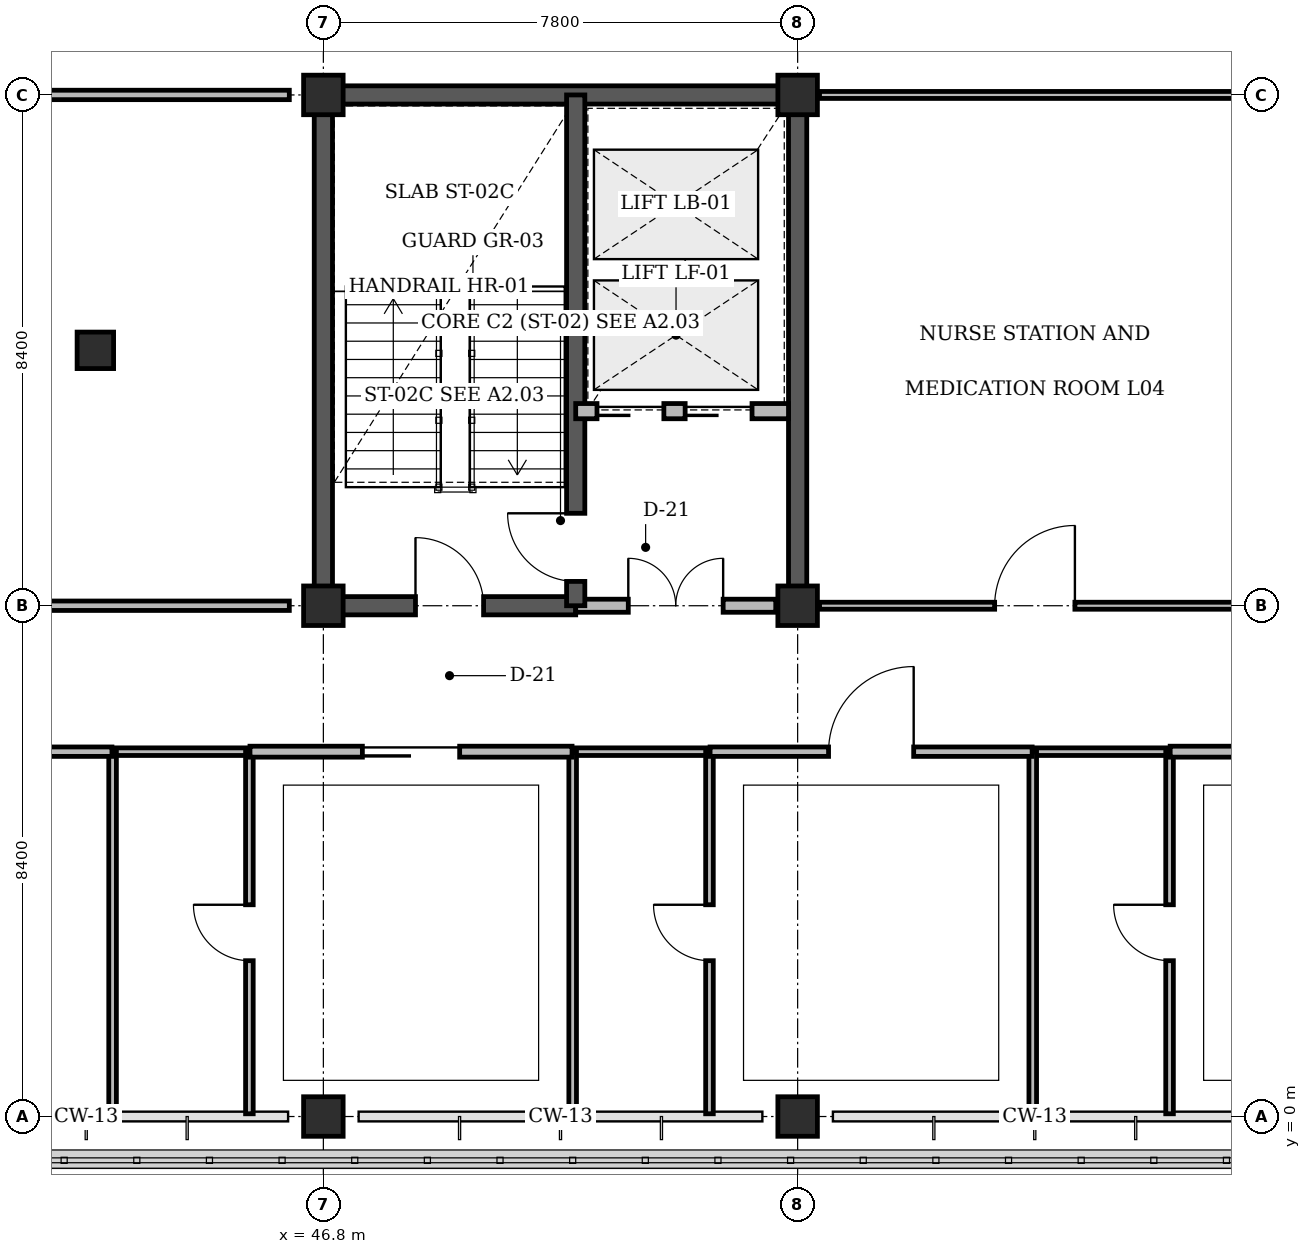
"""IFC4 building model, lengths in metres.
Left out: names, types, materials, properties, quantities, classifications, styles, units other than length and angle.
Written with IfcOpenShell. Run it as: python <this file> out.ifc"""

import sys

from ifc_helpers import new_model, si_unit, direction, frame, frame_2d, origin, origin_2d, place, context, subcontext, project, spatial, rectangle, circle, extrude, element, fill, save


model = new_model("IFC4")
c1 = context("Model", 3, precision=1e-05, world=origin(), true_north=direction((0.0, 1.0)))
c2 = subcontext(c1, "Body", "Model", "MODEL_VIEW")
j1 = project(units=[si_unit("LENGTHUNIT", "METRE"), si_unit("PLANEANGLEUNIT", "RADIAN")], contexts=[c1])
p1 = place(None, origin())
s1 = spatial("IfcSite", under=j1, at=p1, CompositionType="ELEMENT")
p2 = place(p1, origin())
s2 = spatial("IfcBuilding", under=s1, at=p2, CompositionType="ELEMENT")
p3 = place(p2, frame((0.0, 0.0, 18.0)))
s3 = spatial("IfcBuildingStorey", under=s2, at=p3, CompositionType="ELEMENT", Elevation=18.0)
p4 = place(p3, frame((46.65, 16.8, 0.0), z_axis=(0.0, 0.0, 1.0), x_axis=(1.0, 0.0, 0.0)))
e1 = element("IfcWall", 1, at=p4, inside=s3, PredefinedType="SHEAR", context=c2, shape_type="SweptSolid", body=[
    extrude(rectangle(XDim=8.1, YDim=0.3, at=frame_2d((4.05, 0.0))), origin(), (0.0, 0.0, 1.0), 3.92),
])
for number, where, z_axis, x_axis in (
    (2, (46.8, 8.4, 0.0), (0.0, 0.0, 1.0), (0.0, 1.0, 0.0)),
    (3, (54.6, 8.4, 0.0), (0.0, 0.0, 1.0), (0.0, 1.0, 0.0)),
):
    element("IfcWall", number, at=place(p3, frame(where, z_axis=z_axis, x_axis=x_axis)), inside=s3, PredefinedType="SHEAR", context=c2, shape_type="SweptSolid", body=[
        extrude(rectangle(XDim=8.4, YDim=0.3, at=frame_2d((4.2, 0.0))), origin(), (0.0, 0.0, 1.0), 3.92),
    ])
for number, where, z_axis, x_axis in (
    (4, (46.8, 0.0, 0.0), (0.0, 0.0, 1.0), (1.0, 0.0, 0.0)),
    (5, (46.8, 8.4, 0.0), (0.0, 0.0, 1.0), (1.0, 0.0, 0.0)),
    (6, (46.8, 16.8, 0.0), (0.0, 0.0, 1.0), (1.0, 0.0, 0.0)),
    (7, (54.6, 0.0, 0.0), (0.0, 0.0, 1.0), (1.0, 0.0, 0.0)),
    (8, (54.6, 8.4, 0.0), (0.0, 0.0, 1.0), (1.0, 0.0, 0.0)),
    (9, (54.6, 16.8, 0.0), (0.0, 0.0, 1.0), (1.0, 0.0, 0.0)),
):
    element("IfcColumn", number, at=place(p3, frame(where, z_axis=z_axis, x_axis=x_axis)), inside=s3, PredefinedType="COLUMN", context=c2, shape_type="SweptSolid", body=[
        extrude(rectangle(XDim=0.65, YDim=0.65, at=origin_2d()), origin(), (0.0, 0.0, 1.0), 4.2),
    ])
p5 = place(p3, frame((43.05, 12.6, 0.0), z_axis=(0.0, 0.0, 1.0), x_axis=(1.0, 0.0, 0.0)))
e10 = element("IfcColumn", 10, at=p5, inside=s3, PredefinedType="PILASTER", context=c2, shape_type="SweptSolid", body=[
    extrude(circle(Radius=0.3, at=origin_2d()), origin(), (0.0, 0.0, 1.0), 4.2),
])
p6 = place(p3, frame((46.8, 8.4, 0.0), z_axis=(0.0, 0.0, 1.0), x_axis=(1.0, 0.0, 0.0)))
e11 = element("IfcWall", 11, at=p6, inside=s3, PredefinedType="SHEAR", context=c2, shape_type="SweptSolid", body=[
    extrude(rectangle(XDim=4.15, YDim=0.3, at=frame_2d((2.075, 0.0))), origin(), (0.0, 0.0, 1.0), 4.2),
])
p7 = place(p6, frame((1.515, 0.0, 0.0)))
e12 = element("IfcOpeningElement", 12, at=p7, cuts=e11, PredefinedType="OPENING", context=c2, shape_type="SweptSolid", body=[
    extrude(rectangle(XDim=1.12, YDim=2.15, at=frame_2d((0.56, 1.075))), frame((0.0, 0.16, 0.0), z_axis=(0.0, -1.0, 0.0), x_axis=(1.0, 0.0, 0.0)), (0.0, 0.0, 1.0), 0.32),
])
p8 = place(p3, frame((50.95, 8.4, 0.0), z_axis=(0.0, 0.0, 1.0), x_axis=(1.0, 0.0, 0.0)))
e13 = element("IfcWall", 13, at=p8, inside=s3, PredefinedType="STANDARD", context=c2, shape_type="SweptSolid", body=[
    extrude(rectangle(XDim=3.29, YDim=0.215, at=frame_2d((1.645, 0.0))), origin(), (0.0, 0.0, 1.0), 3.22),
])
p9 = place(p8, frame((0.865, 0.0, 0.0)))
e14 = element("IfcOpeningElement", 14, at=p9, cuts=e13, PredefinedType="OPENING", context=c2, shape_type="SweptSolid", body=[
    extrude(rectangle(XDim=1.56, YDim=2.2, at=frame_2d((0.78, 1.1))), frame((0.0, 0.118, 0.0), z_axis=(0.0, -1.0, 0.0), x_axis=(1.0, 0.0, 0.0)), (0.0, 0.0, 1.0), 0.235),
])
p10 = place(p3, frame((50.95, 8.4, 0.0), z_axis=(0.0, 0.0, 1.0), x_axis=(0.0, 1.0, 0.0)))
e15 = element("IfcWall", 15, at=p10, inside=s3, PredefinedType="SHEAR", context=c2, shape_type="SweptSolid", body=[
    extrude(rectangle(XDim=8.4, YDim=0.3, at=frame_2d((4.2, 0.0))), origin(), (0.0, 0.0, 1.0), 4.2),
])
p11 = place(p10, frame((0.4, 0.0, 0.0)))
e16 = element("IfcOpeningElement", 16, at=p11, cuts=e15, PredefinedType="OPENING", context=c2, shape_type="SweptSolid", body=[
    extrude(rectangle(XDim=1.12, YDim=2.15, at=frame_2d((0.56, 1.075))), frame((0.0, 0.16, 0.0), z_axis=(0.0, -1.0, 0.0), x_axis=(1.0, 0.0, 0.0)), (0.0, 0.0, 1.0), 0.32),
])
p12 = place(p3, frame((50.95, 11.6, 0.0), z_axis=(0.0, 0.0, 1.0), x_axis=(1.0, 0.0, 0.0)))
e17 = element("IfcWall", 17, at=p12, inside=s3, PredefinedType="STANDARD", context=c2, shape_type="SweptSolid", body=[
    extrude(rectangle(XDim=3.5, YDim=0.25, at=frame_2d((1.75, 0.0))), origin(), (0.0, 0.0, 1.0), 3.9),
])
p13 = place(p12, frame((0.35, 0.0, 0.0)))
e18 = element("IfcOpeningElement", 18, at=p13, cuts=e17, PredefinedType="OPENING", context=c2, shape_type="SweptSolid", body=[
    extrude(rectangle(XDim=1.1, YDim=2.2, at=frame_2d((0.55, 1.1))), frame((0.0, 0.135, 0.0), z_axis=(0.0, -1.0, 0.0), x_axis=(1.0, 0.0, 0.0)), (0.0, 0.0, 1.0), 0.27),
])
p14 = place(p12, frame((1.8, 0.0, 0.0)))
e19 = element("IfcOpeningElement", 19, at=p14, cuts=e17, PredefinedType="OPENING", context=c2, shape_type="SweptSolid", body=[
    extrude(rectangle(XDim=1.1, YDim=2.2, at=frame_2d((0.55, 1.1))), frame((0.0, 0.135, 0.0), z_axis=(0.0, -1.0, 0.0), x_axis=(1.0, 0.0, 0.0)), (0.0, 0.0, 1.0), 0.27),
])
p15 = place(p3, frame((43.333, 6.0, 0.0), z_axis=(0.0, 0.0, 1.0), x_axis=(1.0, 0.0, 0.0)))
e20 = element("IfcWall", 20, at=p15, inside=s3, PredefinedType="PARTITIONING", context=c2, shape_type="SweptSolid", body=[
    extrude(rectangle(XDim=2.25, YDim=0.125, at=frame_2d((1.125, 0.0))), origin(), (0.0, 0.0, 1.0), 3.9),
])
p16 = place(p3, frame((43.333, 0.045, 0.0), z_axis=(0.0, 0.0, 1.0), x_axis=(0.0, 1.0, 0.0)))
e21 = element("IfcWall", 21, at=p16, inside=s3, PredefinedType="PARTITIONING", context=c2, shape_type="SweptSolid", body=[
    extrude(rectangle(XDim=5.955, YDim=0.125, at=frame_2d((2.978, 0.0))), origin(), (0.0, 0.0, 1.0), 3.9),
])
p17 = place(p3, frame((45.583, 0.045, 0.0), z_axis=(0.0, 0.0, 1.0), x_axis=(0.0, 1.0, 0.0)))
e22 = element("IfcWall", 22, at=p17, inside=s3, PredefinedType="PARTITIONING", context=c2, shape_type="SweptSolid", body=[
    extrude(rectangle(XDim=5.955, YDim=0.125, at=frame_2d((2.978, 0.0))), origin(), (0.0, 0.0, 1.0), 3.9),
])
p18 = place(p17, frame((2.518, 0.0, 0.0)))
e23 = element("IfcOpeningElement", 23, at=p18, cuts=e22, PredefinedType="OPENING", context=c2, shape_type="SweptSolid", body=[
    extrude(rectangle(XDim=0.92, YDim=2.1, at=frame_2d((0.46, 1.05))), frame((0.0, 0.073, 0.0), z_axis=(0.0, -1.0, 0.0), x_axis=(1.0, 0.0, 0.0)), (0.0, 0.0, 1.0), 0.145),
])
p19 = place(p3, frame((50.9, 6.0, 0.0), z_axis=(0.0, 0.0, 1.0), x_axis=(1.0, 0.0, 0.0)))
e24 = element("IfcWall", 24, at=p19, inside=s3, PredefinedType="PARTITIONING", context=c2, shape_type="SweptSolid", body=[
    extrude(rectangle(XDim=2.25, YDim=0.125, at=frame_2d((1.125, 0.0))), origin(), (0.0, 0.0, 1.0), 3.9),
])
p20 = place(p3, frame((50.9, 0.045, 0.0), z_axis=(0.0, 0.0, 1.0), x_axis=(0.0, 1.0, 0.0)))
e25 = element("IfcWall", 25, at=p20, inside=s3, PredefinedType="PARTITIONING", context=c2, shape_type="SweptSolid", body=[
    extrude(rectangle(XDim=5.955, YDim=0.125, at=frame_2d((2.978, 0.0))), origin(), (0.0, 0.0, 1.0), 3.9),
])
p21 = place(p3, frame((53.15, 0.045, 0.0), z_axis=(0.0, 0.0, 1.0), x_axis=(0.0, 1.0, 0.0)))
e26 = element("IfcWall", 26, at=p21, inside=s3, PredefinedType="PARTITIONING", context=c2, shape_type="SweptSolid", body=[
    extrude(rectangle(XDim=5.955, YDim=0.125, at=frame_2d((2.978, 0.0))), origin(), (0.0, 0.0, 1.0), 3.9),
])
p22 = place(p21, frame((2.518, 0.0, 0.0)))
e27 = element("IfcOpeningElement", 27, at=p22, cuts=e26, PredefinedType="OPENING", context=c2, shape_type="SweptSolid", body=[
    extrude(rectangle(XDim=0.92, YDim=2.1, at=frame_2d((0.46, 1.05))), frame((0.0, 0.073, 0.0), z_axis=(0.0, -1.0, 0.0), x_axis=(1.0, 0.0, 0.0)), (0.0, 0.0, 1.0), 0.145),
])
p23 = place(p3, frame((58.467, 6.0, 0.0), z_axis=(0.0, 0.0, 1.0), x_axis=(1.0, 0.0, 0.0)))
e28 = element("IfcWall", 28, at=p23, inside=s3, PredefinedType="PARTITIONING", context=c2, shape_type="SweptSolid", body=[
    extrude(rectangle(XDim=2.25, YDim=0.125, at=frame_2d((1.125, 0.0))), origin(), (0.0, 0.0, 1.0), 3.9),
])
p24 = place(p3, frame((58.467, 0.045, 0.0), z_axis=(0.0, 0.0, 1.0), x_axis=(0.0, 1.0, 0.0)))
e29 = element("IfcWall", 29, at=p24, inside=s3, PredefinedType="PARTITIONING", context=c2, shape_type="SweptSolid", body=[
    extrude(rectangle(XDim=5.955, YDim=0.125, at=frame_2d((2.978, 0.0))), origin(), (0.0, 0.0, 1.0), 3.9),
])
p25 = place(p3, frame((60.717, 0.045, 0.0), z_axis=(0.0, 0.0, 1.0), x_axis=(0.0, 1.0, 0.0)))
e30 = element("IfcWall", 30, at=p25, inside=s3, PredefinedType="PARTITIONING", context=c2, shape_type="SweptSolid", body=[
    extrude(rectangle(XDim=5.955, YDim=0.125, at=frame_2d((2.978, 0.0))), origin(), (0.0, 0.0, 1.0), 3.9),
])
p26 = place(p25, frame((2.518, 0.0, 0.0)))
e31 = element("IfcOpeningElement", 31, at=p26, cuts=e30, PredefinedType="OPENING", context=c2, shape_type="SweptSolid", body=[
    extrude(rectangle(XDim=0.92, YDim=2.1, at=frame_2d((0.46, 1.05))), frame((0.0, 0.073, 0.0), z_axis=(0.0, -1.0, 0.0), x_axis=(1.0, 0.0, 0.0)), (0.0, 0.0, 1.0), 0.145),
])
p27 = place(p3, frame((38.027, 6.0, 0.0), z_axis=(0.0, 0.0, 1.0), x_axis=(1.0, 0.0, 0.0)))
e32 = element("IfcWall", 32, at=p27, inside=s3, PredefinedType="PARTITIONING", context=c2, shape_type="SweptSolid", body=[
    extrude(rectangle(XDim=5.296, YDim=0.155, at=frame_2d((2.648, 0.0))), origin(), (0.0, 0.0, 1.0), 3.9),
])
p28 = place(p27, frame((1.948, 0.0, 0.0)))
e33 = element("IfcOpeningElement", 33, at=p28, cuts=e32, PredefinedType="OPENING", context=c2, shape_type="SweptSolid", body=[
    extrude(rectangle(XDim=1.4, YDim=2.2, at=frame_2d((0.7, 1.1))), frame((0.0, 0.087, 0.0), z_axis=(0.0, -1.0, 0.0), x_axis=(1.0, 0.0, 0.0)), (0.0, 0.0, 1.0), 0.175),
])
p29 = place(p3, frame((45.593, 6.0, 0.0), z_axis=(0.0, 0.0, 1.0), x_axis=(1.0, 0.0, 0.0)))
e34 = element("IfcWall", 34, at=p29, inside=s3, PredefinedType="PARTITIONING", context=c2, shape_type="SweptSolid", body=[
    extrude(rectangle(XDim=5.297, YDim=0.18, at=frame_2d((2.648, 0.0))), origin(), (0.0, 0.0, 1.0), 3.9),
])
p30 = place(p29, frame((1.848, 0.0, 0.0)))
e35 = element("IfcOpeningElement", 35, at=p30, cuts=e34, PredefinedType="OPENING", context=c2, shape_type="SweptSolid", body=[
    extrude(rectangle(XDim=1.6, YDim=2.25, at=frame_2d((0.8, 1.125))), frame((0.0, 0.1, 0.0), z_axis=(0.0, -1.0, 0.0), x_axis=(1.0, 0.0, 0.0)), (0.0, 0.0, 1.0), 0.2),
])
p31 = place(p3, frame((53.16, 6.0, 0.0), z_axis=(0.0, 0.0, 1.0), x_axis=(1.0, 0.0, 0.0)))
e36 = element("IfcWall", 36, at=p31, inside=s3, PredefinedType="PARTITIONING", context=c2, shape_type="SweptSolid", body=[
    extrude(rectangle(XDim=5.297, YDim=0.155, at=frame_2d((2.648, 0.0))), origin(), (0.0, 0.0, 1.0), 3.9),
])
p32 = place(p31, frame((1.948, 0.0, 0.0)))
e37 = element("IfcOpeningElement", 37, at=p32, cuts=e36, PredefinedType="OPENING", context=c2, shape_type="SweptSolid", body=[
    extrude(rectangle(XDim=1.4, YDim=2.2, at=frame_2d((0.7, 1.1))), frame((0.0, 0.087, 0.0), z_axis=(0.0, -1.0, 0.0), x_axis=(1.0, 0.0, 0.0)), (0.0, 0.0, 1.0), 0.175),
])
p33 = place(p3, frame((60.727, 6.0, 0.0), z_axis=(0.0, 0.0, 1.0), x_axis=(1.0, 0.0, 0.0)))
e38 = element("IfcWall", 38, at=p33, inside=s3, PredefinedType="PARTITIONING", context=c2, shape_type="SweptSolid", body=[
    extrude(rectangle(XDim=5.296, YDim=0.18, at=frame_2d((2.648, 0.0))), origin(), (0.0, 0.0, 1.0), 3.9),
])
p34 = place(p33, frame((1.848, 0.0, 0.0)))
e39 = element("IfcOpeningElement", 39, at=p34, cuts=e38, PredefinedType="OPENING", context=c2, shape_type="SweptSolid", body=[
    extrude(rectangle(XDim=1.6, YDim=2.25, at=frame_2d((0.8, 1.125))), frame((0.0, 0.1, 0.0), z_axis=(0.0, -1.0, 0.0), x_axis=(1.0, 0.0, 0.0)), (0.0, 0.0, 1.0), 0.2),
])
p35 = place(p3, frame((54.96, 8.4, 0.0), z_axis=(0.0, 0.0, 1.0), x_axis=(1.0, 0.0, 0.0)))
e40 = element("IfcWall", 40, at=p35, inside=s3, PredefinedType="PARTITIONING", context=c2, shape_type="SweptSolid", body=[
    extrude(rectangle(XDim=7.08, YDim=0.115, at=frame_2d((3.54, 0.0))), origin(), (0.0, 0.0, 1.0), 3.22),
])
p36 = place(p35, frame((2.88, 0.0, 0.0)))
e41 = element("IfcOpeningElement", 41, at=p36, cuts=e40, PredefinedType="OPENING", context=c2, shape_type="SweptSolid", body=[
    extrude(rectangle(XDim=1.32, YDim=2.15, at=frame_2d((0.66, 1.075))), frame((0.0, 0.067, 0.0), z_axis=(0.0, -1.0, 0.0), x_axis=(1.0, 0.0, 0.0)), (0.0, 0.0, 1.0), 0.135),
])
p37 = place(p3, frame((54.96, 16.8, 0.0), z_axis=(0.0, 0.0, 1.0), x_axis=(1.0, 0.0, 0.0)))
e42 = element("IfcWall", 42, at=p37, inside=s3, PredefinedType="PARTITIONING", context=c2, shape_type="SweptSolid", body=[
    extrude(rectangle(XDim=7.08, YDim=0.115, at=frame_2d((3.54, 0.0))), origin(), (0.0, 0.0, 1.0), 3.22),
])
p38 = place(p3, frame((28.21, 8.4, 0.0), z_axis=(0.0, 0.0, 1.0), x_axis=(1.0, 0.0, 0.0)))
e43 = element("IfcWall", 43, at=p38, inside=s3, PredefinedType="PARTITIONING", context=c2, shape_type="SweptSolid", body=[
    extrude(rectangle(XDim=18.03, YDim=0.155, at=frame_2d((9.015, 0.0))), origin(), (0.0, 0.0, 1.0), 3.22),
])
p39 = place(p38, frame((8.315, 0.0, 0.0)))
e44 = element("IfcOpeningElement", 44, at=p39, cuts=e43, PredefinedType="OPENING", context=c2, shape_type="SweptSolid", body=[
    extrude(rectangle(XDim=1.4, YDim=2.2, at=frame_2d((0.7, 1.1))), frame((0.0, 0.087, 0.0), z_axis=(0.0, -1.0, 0.0), x_axis=(1.0, 0.0, 0.0)), (0.0, 0.0, 1.0), 0.175),
])
p40 = place(p3, frame((28.21, 16.8, 0.0), z_axis=(0.0, 0.0, 1.0), x_axis=(1.0, 0.0, 0.0)))
e45 = element("IfcWall", 45, at=p40, inside=s3, PredefinedType="PARTITIONING", context=c2, shape_type="SweptSolid", body=[
    extrude(rectangle(XDim=18.03, YDim=0.155, at=frame_2d((9.015, 0.0))), origin(), (0.0, 0.0, 1.0), 3.22),
])
p41 = place(p7, origin())
e46 = element("IfcDoor", 46, at=p41, inside=s3, OperationType="SINGLE_SWING_LEFT", PredefinedType="DOOR", context=c2, shape_type="SweptSolid", body=[
    extrude(rectangle(XDim=1.12, YDim=2.15, at=frame_2d((0.56, 1.075))), frame((0.0, 0.025, 0.0), z_axis=(0.0, -1.0, 0.0), x_axis=(1.0, 0.0, 0.0)), (0.0, 0.0, 1.0), 0.05),
])
fill(e12, e46)
p42 = place(p9, origin())
e47 = element("IfcDoor", 47, at=p42, inside=s3, OperationType="DOUBLE_DOOR_SINGLE_SWING", PredefinedType="DOOR", context=c2, shape_type="SweptSolid", body=[
    extrude(rectangle(XDim=1.56, YDim=2.2, at=frame_2d((0.78, 1.1))), frame((0.0, 0.025, 0.0), z_axis=(0.0, -1.0, 0.0), x_axis=(1.0, 0.0, 0.0)), (0.0, 0.0, 1.0), 0.05),
])
fill(e14, e47)
p43 = place(p11, origin())
e48 = element("IfcDoor", 48, at=p43, inside=s3, OperationType="SINGLE_SWING_RIGHT", PredefinedType="DOOR", context=c2, shape_type="SweptSolid", body=[
    extrude(rectangle(XDim=1.12, YDim=2.15, at=frame_2d((0.56, 1.075))), frame((0.0, 0.025, 0.0), z_axis=(0.0, -1.0, 0.0), x_axis=(1.0, 0.0, 0.0)), (0.0, 0.0, 1.0), 0.05),
])
fill(e16, e48)
p44 = place(p13, origin())
e49 = element("IfcDoor", 49, at=p44, inside=s3, OperationType="SLIDING_TO_LEFT", PredefinedType="DOOR", context=c2, shape_type="SweptSolid", body=[
    extrude(rectangle(XDim=1.1, YDim=2.2, at=frame_2d((0.55, 1.1))), frame((0.0, 0.025, 0.0), z_axis=(0.0, -1.0, 0.0), x_axis=(1.0, 0.0, 0.0)), (0.0, 0.0, 1.0), 0.05),
])
fill(e18, e49)
p45 = place(p14, origin())
e50 = element("IfcDoor", 50, at=p45, inside=s3, OperationType="SLIDING_TO_LEFT", PredefinedType="DOOR", context=c2, shape_type="SweptSolid", body=[
    extrude(rectangle(XDim=1.1, YDim=2.2, at=frame_2d((0.55, 1.1))), frame((0.0, 0.025, 0.0), z_axis=(0.0, -1.0, 0.0), x_axis=(1.0, 0.0, 0.0)), (0.0, 0.0, 1.0), 0.05),
])
fill(e19, e50)
p46 = place(p18, origin())
e51 = element("IfcDoor", 51, at=p46, inside=s3, OperationType="SINGLE_SWING_RIGHT", PredefinedType="DOOR", context=c2, shape_type="SweptSolid", body=[
    extrude(rectangle(XDim=0.92, YDim=2.1, at=frame_2d((0.46, 1.05))), frame((0.0, 0.025, 0.0), z_axis=(0.0, -1.0, 0.0), x_axis=(1.0, 0.0, 0.0)), (0.0, 0.0, 1.0), 0.05),
])
fill(e23, e51)
p47 = place(p22, origin())
e52 = element("IfcDoor", 52, at=p47, inside=s3, OperationType="SINGLE_SWING_RIGHT", PredefinedType="DOOR", context=c2, shape_type="SweptSolid", body=[
    extrude(rectangle(XDim=0.92, YDim=2.1, at=frame_2d((0.46, 1.05))), frame((0.0, 0.025, 0.0), z_axis=(0.0, -1.0, 0.0), x_axis=(1.0, 0.0, 0.0)), (0.0, 0.0, 1.0), 0.05),
])
fill(e27, e52)
p48 = place(p26, origin())
e53 = element("IfcDoor", 53, at=p48, inside=s3, OperationType="SINGLE_SWING_RIGHT", PredefinedType="DOOR", context=c2, shape_type="SweptSolid", body=[
    extrude(rectangle(XDim=0.92, YDim=2.1, at=frame_2d((0.46, 1.05))), frame((0.0, 0.025, 0.0), z_axis=(0.0, -1.0, 0.0), x_axis=(1.0, 0.0, 0.0)), (0.0, 0.0, 1.0), 0.05),
])
fill(e31, e53)
p49 = place(p30, origin())
e54 = element("IfcDoor", 54, at=p49, inside=s3, OperationType="SLIDING_TO_RIGHT", PredefinedType="DOOR", context=c2, shape_type="SweptSolid", body=[
    extrude(rectangle(XDim=1.6, YDim=2.25, at=frame_2d((0.8, 1.125))), frame((0.0, 0.025, 0.0), z_axis=(0.0, -1.0, 0.0), x_axis=(1.0, 0.0, 0.0)), (0.0, 0.0, 1.0), 0.05),
])
fill(e35, e54)
p50 = place(p32, origin())
e55 = element("IfcDoor", 55, at=p50, inside=s3, OperationType="SINGLE_SWING_RIGHT", PredefinedType="DOOR", context=c2, shape_type="SweptSolid", body=[
    extrude(rectangle(XDim=1.4, YDim=2.2, at=frame_2d((0.7, 1.1))), frame((0.0, 0.025, 0.0), z_axis=(0.0, -1.0, 0.0), x_axis=(1.0, 0.0, 0.0)), (0.0, 0.0, 1.0), 0.05),
])
fill(e37, e55)
p51 = place(p36, origin())
e56 = element("IfcDoor", 56, at=p51, inside=s3, OperationType="SINGLE_SWING_RIGHT", PredefinedType="DOOR", context=c2, shape_type="SweptSolid", body=[
    extrude(rectangle(XDim=1.32, YDim=2.15, at=frame_2d((0.66, 1.075))), frame((0.0, 0.025, 0.0), z_axis=(0.0, -1.0, 0.0), x_axis=(1.0, 0.0, 0.0)), (0.0, 0.0, 1.0), 0.05),
])
fill(e41, e56)
save(model, sys.argv[1])
